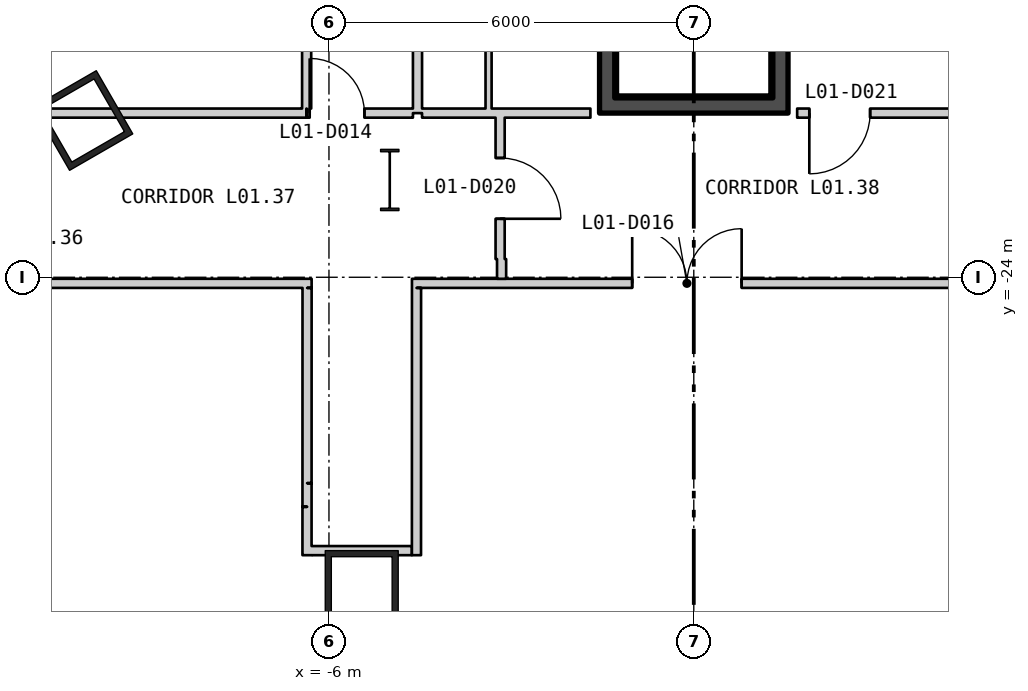
"""IFC4 building model, lengths in metres.
Left out: names, types, materials, properties, quantities, classifications, styles, units other than length and angle.
Written with IfcOpenShell. Run it as: python <this file> out.ifc"""

import sys

from ifc_helpers import new_model, si_unit, direction, frame, frame_2d, origin, origin_2d, place, context, subcontext, project, spatial, rectangle, hollow_rectangle, i_section, extrude, element, fill, save


model = new_model("IFC4")
c1 = context("Model", 3, precision=1e-05, world=origin(), true_north=direction((0.0, 1.0)))
c2 = subcontext(c1, "Body", "Model", "MODEL_VIEW")
j1 = project(units=[si_unit("LENGTHUNIT", "METRE"), si_unit("PLANEANGLEUNIT", "RADIAN")], contexts=[c1])
p1 = place(None, origin())
s1 = spatial("IfcSite", under=j1, at=p1, CompositionType="ELEMENT")
p2 = place(p1, origin())
s2 = spatial("IfcBuilding", under=s1, at=p2, CompositionType="ELEMENT")
p3 = place(p2, frame((0.0, 0.0, 8.4)))
s3 = spatial("IfcBuildingStorey", under=s2, at=p3, CompositionType="ELEMENT", Elevation=8.4)
for number, where, z_axis, x_axis in (
    (1, (-10.046, -21.422, 0.0), (0.0, 0.0, 1.0), (0.5, -0.866, 0.0)),
    (2, (-5.461, -29.096, 0.0), (0.0, 0.0, 1.0), (1.0, 0.0, 0.0)),
):
    element("IfcColumn", number, at=place(p3, frame(where, z_axis=z_axis, x_axis=x_axis)), inside=s3, PredefinedType="COLUMN", context=c2, shape_type="SweptSolid", body=[
        extrude(hollow_rectangle(XDim=1.2, YDim=1.2, WallThickness=0.1, at=origin_2d()), origin(), (0.0, 0.0, 1.0), 5.1),
    ])
p4 = place(p3, frame((-5.0, -22.4, 0.0), z_axis=(0.0, 0.0, 1.0), x_axis=(1.0, 0.0, 0.0)))
e3 = element("IfcColumn", 3, at=p4, inside=s3, PredefinedType="COLUMN", context=c2, shape_type="SweptSolid", body=[
    extrude(i_section(OverallWidth=0.302, OverallDepth=1.008, WebThickness=0.021, FlangeThickness=0.04, at=origin_2d()), origin(), (0.0, 0.0, 1.0), 5.1),
])
p5 = place(p3, frame((-1.425, -21.05, 0.0), z_axis=(0.0, 0.0, 1.0), x_axis=(0.0, 1.0, 0.0)))
e4 = element("IfcWall", 4, at=p5, inside=s3, PredefinedType="SHEAR", context=c2, shape_type="SweptSolid", body=[
    extrude(rectangle(XDim=7.2, YDim=0.25, at=frame_2d((3.6, 0.0))), origin(), (0.0, 0.0, 1.0), 4.88),
])
p6 = place(p3, frame((1.425, -21.05, 0.0), z_axis=(0.0, 0.0, 1.0), x_axis=(0.0, 1.0, 0.0)))
e5 = element("IfcWall", 5, at=p6, inside=s3, PredefinedType="SHEAR", context=c2, shape_type="SweptSolid", body=[
    extrude(rectangle(XDim=7.2, YDim=0.25, at=frame_2d((3.6, 0.0))), origin(), (0.0, 0.0, 1.0), 4.88),
])
p7 = place(p6, frame((5.89, 0.0, 0.0)))
e6 = element("IfcOpeningElement", 6, at=p7, cuts=e5, PredefinedType="OPENING", context=c2, shape_type="SweptSolid", body=[
    extrude(rectangle(XDim=1.0, YDim=2.1, at=frame_2d((0.5, 1.05))), frame((0.0, 0.135, 0.0), z_axis=(0.0, -1.0, 0.0), x_axis=(1.0, 0.0, 0.0)), (0.0, 0.0, 1.0), 0.27),
])
p8 = place(p3, frame((-1.55, -21.175, 0.0), z_axis=(0.0, 0.0, 1.0), x_axis=(1.0, 0.0, 0.0)))
e7 = element("IfcWall", 7, at=p8, inside=s3, PredefinedType="SHEAR", context=c2, shape_type="SweptSolid", body=[
    extrude(rectangle(XDim=3.1, YDim=0.25, at=frame_2d((1.55, 0.0))), origin(), (0.0, 0.0, 1.0), 4.88),
])
p9 = place(p3, frame((-17.025, -21.3, 0.0), z_axis=(0.0, 0.0, 1.0), x_axis=(1.0, 0.0, 0.0)))
e8 = element("IfcWall", 8, at=p9, inside=s3, PredefinedType="PARTITIONING", context=c2, shape_type="SweptSolid", body=[
    extrude(rectangle(XDim=10.655, YDim=0.15, at=frame_2d((5.327, 0.0))), origin(), (0.0, 0.0, 1.0), 4.88),
])
p10 = place(p3, frame((-12.658, -24.1, 0.0), z_axis=(0.0, 0.0, 1.0), x_axis=(1.0, 0.0, 0.0)))
e9 = element("IfcWall", 9, at=p10, inside=s3, PredefinedType="PARTITIONING", context=c2, shape_type="SweptSolid", body=[
    extrude(rectangle(XDim=6.373, YDim=0.15, at=frame_2d((3.187, 0.0))), origin(), (0.0, 0.0, 1.0), 4.88),
])
p11 = place(p3, frame((-6.367, -21.3, 0.0), z_axis=(0.0, 0.0, 1.0), x_axis=(1.0, 0.0, 0.0)))
e10 = element("IfcWall", 10, at=p11, inside=s3, PredefinedType="PARTITIONING", context=c2, shape_type="SweptSolid", body=[
    extrude(rectangle(XDim=1.748, YDim=0.15, at=frame_2d((0.874, 0.0))), origin(), (0.0, 0.0, 1.0), 4.88),
])
p12 = place(p11, frame((0.05, 0.0, 0.0)))
e11 = element("IfcOpeningElement", 11, at=p12, cuts=e10, PredefinedType="OPENING", context=c2, shape_type="SweptSolid", body=[
    extrude(rectangle(XDim=0.9, YDim=2.1, at=frame_2d((0.45, 1.05))), frame((0.0, 0.085, 0.0), z_axis=(0.0, -1.0, 0.0), x_axis=(1.0, 0.0, 0.0)), (0.0, 0.0, 1.0), 0.17),
])
p13 = place(p3, frame((-6.367, -21.225, 0.0), z_axis=(0.0, 0.0, 1.0), x_axis=(0.0, 1.0, 0.0)))
e12 = element("IfcWall", 12, at=p13, inside=s3, PredefinedType="PARTITIONING", context=c2, shape_type="SweptSolid", body=[
    extrude(rectangle(XDim=7.622, YDim=0.15, at=frame_2d((3.811, 0.0))), origin(), (0.0, 0.0, 1.0), 4.28),
])
p14 = place(p3, frame((-6.361, -28.571, 0.0), z_axis=(0.0, 0.0, 1.0), x_axis=(0.000251572319, 0.999999968356, 0.0)))
e13 = element("IfcWall", 13, at=p14, inside=s3, PredefinedType="PARTITIONING", context=c2, shape_type="SweptSolid", body=[
    extrude(rectangle(XDim=0.795, YDim=0.15, at=frame_2d((0.398, 0.0))), origin(), (0.0, 0.0, 1.0), 4.28),
])
p15 = place(p3, frame((-6.361, -27.776, 0.0), z_axis=(0.0, 0.0, 1.0), x_axis=(0.000256410248, 0.999999967127, 0.0)))
e14 = element("IfcWall", 14, at=p15, inside=s3, PredefinedType="PARTITIONING", context=c2, shape_type="SweptSolid", body=[
    extrude(rectangle(XDim=0.39, YDim=0.15, at=frame_2d((0.195, 0.0))), origin(), (0.0, 0.0, 1.0), 4.88),
])
p16 = place(p3, frame((-6.361, -27.386, 0.0), z_axis=(0.0, 0.0, 1.0), x_axis=(0.000218000618, 0.999999976238, 0.0)))
e15 = element("IfcWall", 15, at=p16, inside=s3, PredefinedType="PARTITIONING", context=c2, shape_type="SweptSolid", body=[
    extrude(rectangle(XDim=3.211, YDim=0.15, at=frame_2d((1.605, 0.0))), origin(), (0.0, 0.0, 1.0), 4.28),
])
p17 = place(p3, frame((-6.286, -28.496, 0.0), z_axis=(0.0, 0.0, 1.0), x_axis=(1.0, 0.0, 0.0)))
e16 = element("IfcWall", 16, at=p17, inside=s3, PredefinedType="PARTITIONING", context=c2, shape_type="SweptSolid", body=[
    extrude(rectangle(XDim=1.65, YDim=0.15, at=frame_2d((0.825, 0.0))), origin(), (0.0, 0.0, 1.0), 4.88),
])
p18 = place(p3, frame((-4.635, -24.1, 0.0), z_axis=(0.0, 0.0, 1.0), x_axis=(1.0, 0.0, 0.0)))
e17 = element("IfcWall", 17, at=p18, inside=s3, PredefinedType="PARTITIONING", context=c2, shape_type="SweptSolid", body=[
    extrude(rectangle(XDim=17.368, YDim=0.15, at=frame_2d((8.684, 0.0))), origin(), (0.0, 0.0, 1.0), 4.88),
])
p19 = place(p18, frame((3.622, 0.0, 0.0)))
e18 = element("IfcOpeningElement", 18, at=p19, cuts=e17, PredefinedType="OPENING", context=c2, shape_type="SweptSolid", body=[
    extrude(rectangle(XDim=1.8, YDim=2.1, at=frame_2d((0.9, 1.05))), frame((0.0, 0.085, 0.0), z_axis=(0.0, -1.0, 0.0), x_axis=(1.0, 0.0, 0.0)), (0.0, 0.0, 1.0), 0.17),
])
p20 = place(p18, frame((16.168, 0.0, 0.0)))
e19 = element("IfcOpeningElement", 19, at=p20, cuts=e17, PredefinedType="OPENING", context=c2, shape_type="SweptSolid", body=[
    extrude(rectangle(XDim=1.0, YDim=2.1, at=frame_2d((0.5, 1.05))), frame((0.0, 0.085, 0.0), z_axis=(0.0, -1.0, 0.0), x_axis=(1.0, 0.0, 0.0)), (0.0, 0.0, 1.0), 0.17),
])
p21 = place(p3, frame((-4.561, -28.571, 0.0), z_axis=(0.0, 0.0, 1.0), x_axis=(0.000227479521, 0.999999974127, 0.0)))
e20 = element("IfcWall", 20, at=p21, inside=s3, PredefinedType="PARTITIONING", context=c2, shape_type="SweptSolid", body=[
    extrude(rectangle(XDim=4.396, YDim=0.15, at=frame_2d((2.198, 0.0))), origin(), (0.0, 0.0, 1.0), 4.88),
])
p22 = place(p3, frame((-4.544, -21.3, 0.0), z_axis=(0.0, 0.0, 1.0), x_axis=(0.0, 1.0, 0.0)))
e21 = element("IfcWall", 21, at=p22, inside=s3, PredefinedType="PARTITIONING", context=c2, shape_type="SweptSolid", body=[
    extrude(rectangle(XDim=7.7, YDim=0.15, at=frame_2d((3.85, 0.0))), origin(), (0.0, 0.0, 1.0), 4.88),
])
p23 = place(p3, frame((-4.469, -21.3, 0.0), z_axis=(0.0, 0.0, 1.0), x_axis=(1.0, 0.0, 0.0)))
e22 = element("IfcWall", 22, at=p23, inside=s3, PredefinedType="PARTITIONING", context=c2, shape_type="SweptSolid", body=[
    extrude(rectangle(XDim=2.769, YDim=0.15, at=frame_2d((1.385, 0.0))), origin(), (0.0, 0.0, 1.0), 4.88),
])
p24 = place(p3, frame((-3.375, -21.225, 0.0), z_axis=(0.0, 0.0, 1.0), x_axis=(0.0, 1.0, 0.0)))
e23 = element("IfcWall", 23, at=p24, inside=s3, PredefinedType="PARTITIONING", context=c2, shape_type="SweptSolid", body=[
    extrude(rectangle(XDim=7.55, YDim=0.1, at=frame_2d((3.775, 0.0))), origin(), (0.0, 0.0, 1.0), 4.88),
])
p25 = place(p3, frame((-3.185, -23.7, 0.0), z_axis=(0.0, 0.0, 1.0), x_axis=(0.0, 1.0, 0.0)))
e24 = element("IfcWall", 24, at=p25, inside=s3, PredefinedType="PARTITIONING", context=c2, shape_type="SweptSolid", body=[
    extrude(rectangle(XDim=2.325, YDim=0.15, at=frame_2d((1.163, 0.0))), origin(), (0.0, 0.0, 1.0), 4.28),
])
p26 = place(p25, frame((0.662, 0.0, 0.0)))
e25 = element("IfcOpeningElement", 25, at=p26, cuts=e24, PredefinedType="OPENING", context=c2, shape_type="SweptSolid", body=[
    extrude(rectangle(XDim=1.0, YDim=2.1, at=frame_2d((0.5, 1.05))), frame((0.0, 0.085, 0.0), z_axis=(0.0, -1.0, 0.0), x_axis=(1.0, 0.0, 0.0)), (0.0, 0.0, 1.0), 0.17),
])
p27 = place(p3, frame((-3.161, -24.025, 0.0), z_axis=(0.0, 0.0, 1.0), x_axis=(0.0, 1.0, 0.0)))
e26 = element("IfcWall", 26, at=p27, inside=s3, PredefinedType="PARTITIONING", context=c2, shape_type="SweptSolid", body=[
    extrude(rectangle(XDim=0.325, YDim=0.15, at=frame_2d((0.163, 0.0))), origin(), (0.0, 0.0, 1.0), 4.88),
])
p28 = place(p3, frame((1.7, -21.3, 0.0), z_axis=(0.0, 0.0, 1.0), x_axis=(1.0, 0.0, 0.0)))
e27 = element("IfcWall", 27, at=p28, inside=s3, PredefinedType="PARTITIONING", context=c2, shape_type="SweptSolid", body=[
    extrude(rectangle(XDim=15.325, YDim=0.15, at=frame_2d((7.662, 0.0))), origin(), (0.0, 0.0, 1.0), 4.88),
])
p29 = place(p28, frame((0.2, 0.0, 0.0)))
e28 = element("IfcOpeningElement", 28, at=p29, cuts=e27, PredefinedType="OPENING", context=c2, shape_type="SweptSolid", body=[
    extrude(rectangle(XDim=1.0, YDim=2.1, at=frame_2d((0.5, 1.05))), frame((0.0, 0.085, 0.0), z_axis=(0.0, -1.0, 0.0), x_axis=(1.0, 0.0, 0.0)), (0.0, 0.0, 1.0), 0.17),
])
p30 = place(p12, origin())
e29 = element("IfcDoor", 29, at=p30, inside=s3, OperationType="SINGLE_SWING_RIGHT", PredefinedType="DOOR", context=c2, shape_type="SweptSolid", body=[
    extrude(rectangle(XDim=0.9, YDim=2.1, at=frame_2d((0.45, 1.05))), frame((0.0, 0.025, 0.0), z_axis=(0.0, -1.0, 0.0), x_axis=(1.0, 0.0, 0.0)), (0.0, 0.0, 1.0), 0.05),
])
fill(e11, e29)
p31 = place(p19, origin())
e30 = element("IfcDoor", 30, at=p31, inside=s3, OperationType="DOUBLE_DOOR_SINGLE_SWING", PredefinedType="DOOR", context=c2, shape_type="SweptSolid", body=[
    extrude(rectangle(XDim=1.8, YDim=2.1, at=frame_2d((0.9, 1.05))), frame((0.0, 0.025, 0.0), z_axis=(0.0, -1.0, 0.0), x_axis=(1.0, 0.0, 0.0)), (0.0, 0.0, 1.0), 0.05),
])
fill(e18, e30)
p32 = place(p26, origin())
e31 = element("IfcDoor", 31, at=p32, inside=s3, OperationType="SINGLE_SWING_LEFT", PredefinedType="DOOR", context=c2, shape_type="SweptSolid", body=[
    extrude(rectangle(XDim=1.0, YDim=2.1, at=frame_2d((0.5, 1.05))), frame((0.0, 0.025, 0.0), z_axis=(0.0, -1.0, 0.0), x_axis=(1.0, 0.0, 0.0)), (0.0, 0.0, 1.0), 0.05),
])
fill(e25, e31)
p33 = place(p29, origin())
e32 = element("IfcDoor", 32, at=p33, inside=s3, OperationType="SINGLE_SWING_LEFT", PredefinedType="DOOR", context=c2, shape_type="SweptSolid", body=[
    extrude(rectangle(XDim=1.0, YDim=2.1, at=frame_2d((0.5, 1.05))), frame((0.0, 0.025, 0.0), z_axis=(0.0, -1.0, 0.0), x_axis=(1.0, 0.0, 0.0)), (0.0, 0.0, 1.0), 0.05),
])
fill(e28, e32)
save(model, sys.argv[1])
